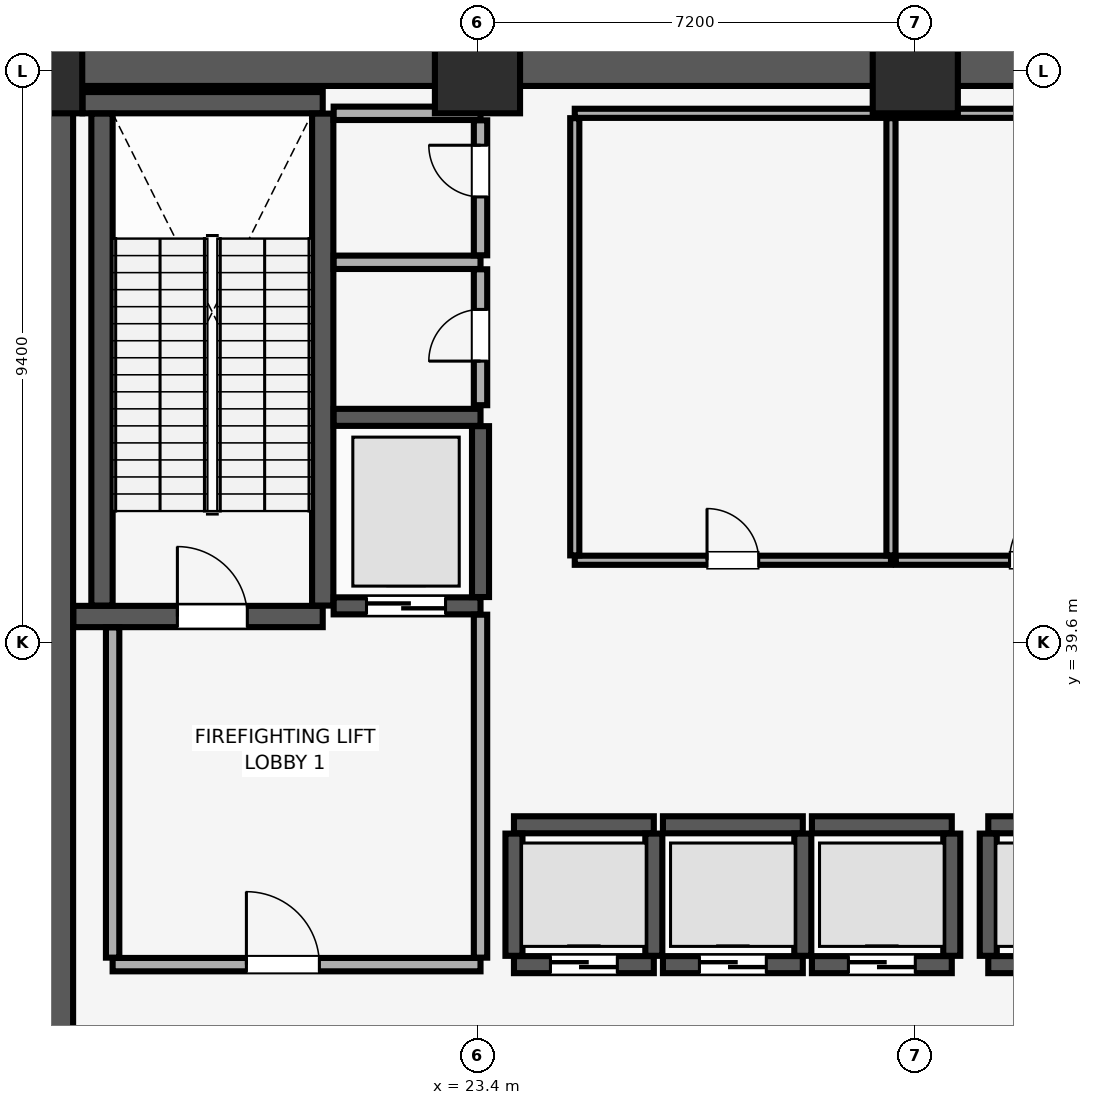
"""IFC4 building model, lengths in metres.
Left out: names, types, materials, properties, quantities, classifications, styles, units other than length and angle.
Written with IfcOpenShell. Run it as: python <this file> out.ifc"""

import sys

from ifc_helpers import new_model, si_unit, direction, frame, frame_2d, origin, origin_2d, place, context, subcontext, project, spatial, rectangle, extrude, element, fill, save


model = new_model("IFC4")
c1 = context("Model", 3, precision=1e-05, world=origin(), true_north=direction((0.0, 1.0)))
c2 = subcontext(c1, "Body", "Model", "MODEL_VIEW")
j1 = project(units=[si_unit("LENGTHUNIT", "METRE"), si_unit("PLANEANGLEUNIT", "RADIAN")], contexts=[c1])
p1 = place(None, origin())
s1 = spatial("IfcSite", under=j1, at=p1, CompositionType="ELEMENT")
p2 = place(p1, origin())
s2 = spatial("IfcBuilding", under=s1, at=p2, CompositionType="ELEMENT")
p3 = place(p2, frame((0.0, 0.0, 8.0)))
s3 = spatial("IfcBuildingStorey", under=s2, at=p3, CompositionType="ELEMENT", Elevation=8.0)
for number, where, z_axis, x_axis in (
    (1, (16.2, 49.0, 0.0), (0.0, 0.0, 1.0), (1.0, 0.0, 0.0)),
    (2, (23.4, 49.0, 0.0), (0.0, 0.0, 1.0), (1.0, 0.0, 0.0)),
    (3, (30.6, 49.0, 0.0), (0.0, 0.0, 1.0), (1.0, 0.0, 0.0)),
):
    element("IfcColumn", number, at=place(p3, frame(where, z_axis=z_axis, x_axis=x_axis)), inside=s3, PredefinedType="COLUMN", context=c2, shape_type="SweptSolid", body=[
        extrude(rectangle(XDim=1.4, YDim=1.4, at=origin_2d()), origin(), (0.0, 0.0, 1.0), 5.68),
    ])
p4 = place(p3, frame((16.2, 49.3, 0.0), z_axis=(0.0, 0.0, 1.0), x_axis=(1.0, 0.0, 0.0)))
e4 = element("IfcWall", 4, at=p4, inside=s3, PredefinedType="SHEAR", context=c2, shape_type="SweptSolid", body=[
    extrude(rectangle(XDim=51.6, YDim=1.1, at=frame_2d((25.8, 0.0))), origin(), (0.0, 0.0, 1.0), 5.68),
])
p5 = place(p3, frame((16.2, 29.4, 0.0), z_axis=(0.0, 0.0, 1.0), x_axis=(0.0, 1.0, 0.0)))
e5 = element("IfcWall", 5, at=p5, inside=s3, PredefinedType="SHEAR", context=c2, shape_type="SweptSolid", body=[
    extrude(rectangle(XDim=19.2, YDim=1.1, at=frame_2d((9.6, 0.0))), origin(), (0.0, 0.0, 1.0), 5.68),
])
p6 = place(p3, frame((16.755, 40.025, 0.0), z_axis=(0.0, 0.0, 1.0), x_axis=(1.0, 0.0, 0.0)))
e6 = element("IfcWall", 6, at=p6, inside=s3, PredefinedType="SHEAR", context=c2, shape_type="SweptSolid", body=[
    extrude(rectangle(XDim=4.1, YDim=0.35, at=frame_2d((2.05, 0.0))), origin(), (0.0, 0.0, 1.0), 5.68),
])
p7 = place(p6, frame((1.71, 0.0, 0.0)))
e7 = element("IfcOpeningElement", 7, at=p7, cuts=e6, PredefinedType="OPENING", context=c2, shape_type="SweptSolid", body=[
    extrude(rectangle(XDim=1.15, YDim=2.15, at=frame_2d((0.575, 1.075))), frame((0.0, 0.185, 0.0), z_axis=(0.0, -1.0, 0.0), x_axis=(1.0, 0.0, 0.0)), (0.0, 0.0, 1.0), 0.37),
])
p8 = place(p3, frame((16.905, 48.475, 0.0), z_axis=(0.0, 0.0, 1.0), x_axis=(1.0, 0.0, 0.0)))
e8 = element("IfcWall", 8, at=p8, inside=s3, PredefinedType="SHEAR", context=c2, shape_type="SweptSolid", body=[
    extrude(rectangle(XDim=3.95, YDim=0.35, at=frame_2d((1.975, 0.0))), origin(), (0.0, 0.0, 1.0), 5.68),
])
for number, where, z_axis, x_axis in (
    (9, (17.225, 40.205, 0.0), (0.0, 0.0, 1.0), (0.0, 1.0, 0.0)),
    (10, (20.855, 40.205, 0.0), (0.0, 0.0, 1.0), (0.0, 1.0, 0.0)),
):
    element("IfcWall", number, at=place(p3, frame(where, z_axis=z_axis, x_axis=x_axis)), inside=s3, PredefinedType="SHEAR", context=c2, shape_type="SweptSolid", body=[
        extrude(rectangle(XDim=8.09, YDim=0.35, at=frame_2d((4.045, 0.0))), origin(), (0.0, 0.0, 1.0), 5.68),
    ])
p9 = place(p3, frame((24.0, 34.3, 0.0), z_axis=(0.0, 0.0, 1.0), x_axis=(1.0, 0.0, 0.0)))
e11 = element("IfcWall", 11, at=p9, inside=s3, PredefinedType="SHEAR", context=c2, shape_type="SweptSolid", body=[
    extrude(rectangle(XDim=2.3, YDim=0.28, at=frame_2d((1.15, 0.0))), origin(), (0.0, 0.0, 1.0), 5.68),
])
p10 = place(p9, frame((0.6, 0.0, 0.0)))
e12 = element("IfcOpeningElement", 12, at=p10, cuts=e11, PredefinedType="OPENING", context=c2, shape_type="SweptSolid", body=[
    extrude(rectangle(XDim=1.1, YDim=2.2, at=frame_2d((0.55, 1.1))), frame((0.0, 0.15, 0.0), z_axis=(0.0, -1.0, 0.0), x_axis=(1.0, 0.0, 0.0)), (0.0, 0.0, 1.0), 0.3),
])
p11 = place(p3, frame((24.0, 36.6, 0.0), z_axis=(0.0, 0.0, 1.0), x_axis=(1.0, 0.0, 0.0)))
e13 = element("IfcWall", 13, at=p11, inside=s3, PredefinedType="SHEAR", context=c2, shape_type="SweptSolid", body=[
    extrude(rectangle(XDim=2.3, YDim=0.28, at=frame_2d((1.15, 0.0))), origin(), (0.0, 0.0, 1.0), 5.68),
])
for number, where, z_axis, x_axis in (
    (14, (24.0, 34.445, 0.0), (0.0, 0.0, 1.0), (0.0, 1.0, 0.0)),
    (15, (26.3, 34.445, 0.0), (0.0, 0.0, 1.0), (0.0, 1.0, 0.0)),
):
    element("IfcWall", number, at=place(p3, frame(where, z_axis=z_axis, x_axis=x_axis)), inside=s3, PredefinedType="SHEAR", context=c2, shape_type="SweptSolid", body=[
        extrude(rectangle(XDim=2.01, YDim=0.28, at=frame_2d((1.005, 0.0))), origin(), (0.0, 0.0, 1.0), 5.68),
    ])
p12 = place(p3, frame((26.45, 34.3, 0.0), z_axis=(0.0, 0.0, 1.0), x_axis=(1.0, 0.0, 0.0)))
e16 = element("IfcWall", 16, at=p12, inside=s3, PredefinedType="SHEAR", context=c2, shape_type="SweptSolid", body=[
    extrude(rectangle(XDim=2.3, YDim=0.28, at=frame_2d((1.15, 0.0))), origin(), (0.0, 0.0, 1.0), 5.68),
])
p13 = place(p12, frame((0.6, 0.0, 0.0)))
e17 = element("IfcOpeningElement", 17, at=p13, cuts=e16, PredefinedType="OPENING", context=c2, shape_type="SweptSolid", body=[
    extrude(rectangle(XDim=1.1, YDim=2.2, at=frame_2d((0.55, 1.1))), frame((0.0, 0.15, 0.0), z_axis=(0.0, -1.0, 0.0), x_axis=(1.0, 0.0, 0.0)), (0.0, 0.0, 1.0), 0.3),
])
p14 = place(p3, frame((26.45, 36.6, 0.0), z_axis=(0.0, 0.0, 1.0), x_axis=(1.0, 0.0, 0.0)))
e18 = element("IfcWall", 18, at=p14, inside=s3, PredefinedType="SHEAR", context=c2, shape_type="SweptSolid", body=[
    extrude(rectangle(XDim=2.3, YDim=0.28, at=frame_2d((1.15, 0.0))), origin(), (0.0, 0.0, 1.0), 5.68),
])
p15 = place(p3, frame((28.75, 34.445, 0.0), z_axis=(0.0, 0.0, 1.0), x_axis=(0.0, 1.0, 0.0)))
e19 = element("IfcWall", 19, at=p15, inside=s3, PredefinedType="SHEAR", context=c2, shape_type="SweptSolid", body=[
    extrude(rectangle(XDim=2.01, YDim=0.28, at=frame_2d((1.005, 0.0))), origin(), (0.0, 0.0, 1.0), 5.68),
])
p16 = place(p3, frame((28.9, 34.3, 0.0), z_axis=(0.0, 0.0, 1.0), x_axis=(1.0, 0.0, 0.0)))
e20 = element("IfcWall", 20, at=p16, inside=s3, PredefinedType="SHEAR", context=c2, shape_type="SweptSolid", body=[
    extrude(rectangle(XDim=2.3, YDim=0.28, at=frame_2d((1.15, 0.0))), origin(), (0.0, 0.0, 1.0), 5.68),
])
p17 = place(p16, frame((0.6, 0.0, 0.0)))
e21 = element("IfcOpeningElement", 21, at=p17, cuts=e20, PredefinedType="OPENING", context=c2, shape_type="SweptSolid", body=[
    extrude(rectangle(XDim=1.1, YDim=2.2, at=frame_2d((0.55, 1.1))), frame((0.0, 0.15, 0.0), z_axis=(0.0, -1.0, 0.0), x_axis=(1.0, 0.0, 0.0)), (0.0, 0.0, 1.0), 0.3),
])
p18 = place(p3, frame((28.9, 36.6, 0.0), z_axis=(0.0, 0.0, 1.0), x_axis=(1.0, 0.0, 0.0)))
e22 = element("IfcWall", 22, at=p18, inside=s3, PredefinedType="SHEAR", context=c2, shape_type="SweptSolid", body=[
    extrude(rectangle(XDim=2.3, YDim=0.28, at=frame_2d((1.15, 0.0))), origin(), (0.0, 0.0, 1.0), 5.68),
])
p19 = place(p3, frame((31.2, 34.445, 0.0), z_axis=(0.0, 0.0, 1.0), x_axis=(0.0, 1.0, 0.0)))
e23 = element("IfcWall", 23, at=p19, inside=s3, PredefinedType="SHEAR", context=c2, shape_type="SweptSolid", body=[
    extrude(rectangle(XDim=2.01, YDim=0.28, at=frame_2d((1.005, 0.0))), origin(), (0.0, 0.0, 1.0), 5.68),
])
p20 = place(p3, frame((31.8, 34.3, 0.0), z_axis=(0.0, 0.0, 1.0), x_axis=(1.0, 0.0, 0.0)))
e24 = element("IfcWall", 24, at=p20, inside=s3, PredefinedType="SHEAR", context=c2, shape_type="SweptSolid", body=[
    extrude(rectangle(XDim=2.3, YDim=0.28, at=frame_2d((1.15, 0.0))), origin(), (0.0, 0.0, 1.0), 5.68),
])
p21 = place(p20, frame((0.6, 0.0, 0.0)))
e25 = element("IfcOpeningElement", 25, at=p21, cuts=e24, PredefinedType="OPENING", context=c2, shape_type="SweptSolid", body=[
    extrude(rectangle(XDim=1.1, YDim=2.2, at=frame_2d((0.55, 1.1))), frame((0.0, 0.15, 0.0), z_axis=(0.0, -1.0, 0.0), x_axis=(1.0, 0.0, 0.0)), (0.0, 0.0, 1.0), 0.3),
])
p22 = place(p3, frame((31.8, 36.6, 0.0), z_axis=(0.0, 0.0, 1.0), x_axis=(1.0, 0.0, 0.0)))
e26 = element("IfcWall", 26, at=p22, inside=s3, PredefinedType="SHEAR", context=c2, shape_type="SweptSolid", body=[
    extrude(rectangle(XDim=2.3, YDim=0.28, at=frame_2d((1.15, 0.0))), origin(), (0.0, 0.0, 1.0), 5.68),
])
p23 = place(p3, frame((31.8, 34.445, 0.0), z_axis=(0.0, 0.0, 1.0), x_axis=(0.0, 1.0, 0.0)))
e27 = element("IfcWall", 27, at=p23, inside=s3, PredefinedType="SHEAR", context=c2, shape_type="SweptSolid", body=[
    extrude(rectangle(XDim=2.01, YDim=0.28, at=frame_2d((1.005, 0.0))), origin(), (0.0, 0.0, 1.0), 5.68),
])
p24 = place(p3, frame((21.035, 40.2, 0.0), z_axis=(0.0, 0.0, 1.0), x_axis=(1.0, 0.0, 0.0)))
e28 = element("IfcWall", 28, at=p24, inside=s3, PredefinedType="SHEAR", context=c2, shape_type="SweptSolid", body=[
    extrude(rectangle(XDim=2.415, YDim=0.28, at=frame_2d((1.208, 0.0))), origin(), (0.0, 0.0, 1.0), 5.68),
])
p25 = place(p24, frame((0.54, 0.0, 0.0)))
e29 = element("IfcOpeningElement", 29, at=p25, cuts=e28, PredefinedType="OPENING", context=c2, shape_type="SweptSolid", body=[
    extrude(rectangle(XDim=1.3, YDim=2.3, at=frame_2d((0.65, 1.15))), frame((0.0, 0.15, 0.0), z_axis=(0.0, -1.0, 0.0), x_axis=(1.0, 0.0, 0.0)), (0.0, 0.0, 1.0), 0.3),
])
p26 = place(p3, frame((21.035, 43.3, 0.0), z_axis=(0.0, 0.0, 1.0), x_axis=(1.0, 0.0, 0.0)))
e30 = element("IfcWall", 30, at=p26, inside=s3, PredefinedType="SHEAR", context=c2, shape_type="SweptSolid", body=[
    extrude(rectangle(XDim=2.415, YDim=0.28, at=frame_2d((1.208, 0.0))), origin(), (0.0, 0.0, 1.0), 5.68),
])
p27 = place(p3, frame((23.45, 40.345, 0.0), z_axis=(0.0, 0.0, 1.0), x_axis=(0.0, 1.0, 0.0)))
e31 = element("IfcWall", 31, at=p27, inside=s3, PredefinedType="SHEAR", context=c2, shape_type="SweptSolid", body=[
    extrude(rectangle(XDim=2.81, YDim=0.28, at=frame_2d((1.405, 0.0))), origin(), (0.0, 0.0, 1.0), 5.68),
])
p28 = place(p3, frame((17.4, 34.3, 0.0), z_axis=(0.0, 0.0, 1.0), x_axis=(1.0, 0.0, 0.0)))
e32 = element("IfcWall", 32, at=p28, inside=s3, PredefinedType="PARTITIONING", context=c2, shape_type="SweptSolid", body=[
    extrude(rectangle(XDim=6.05, YDim=0.22, at=frame_2d((3.025, 0.0))), origin(), (0.0, 0.0, 1.0), 5.68),
])
p29 = place(p28, frame((2.2, 0.0, 0.0)))
e33 = element("IfcOpeningElement", 33, at=p29, cuts=e32, PredefinedType="OPENING", context=c2, shape_type="SweptSolid", body=[
    extrude(rectangle(XDim=1.2, YDim=2.15, at=frame_2d((0.6, 1.075))), frame((0.0, 0.12, 0.0), z_axis=(0.0, -1.0, 0.0), x_axis=(1.0, 0.0, 0.0)), (0.0, 0.0, 1.0), 0.24),
])
p30 = place(p3, frame((17.4, 34.415, 0.0), z_axis=(0.0, 0.0, 1.0), x_axis=(0.0, 1.0, 0.0)))
e34 = element("IfcWall", 34, at=p30, inside=s3, PredefinedType="PARTITIONING", context=c2, shape_type="SweptSolid", body=[
    extrude(rectangle(XDim=5.43, YDim=0.22, at=frame_2d((2.715, 0.0))), origin(), (0.0, 0.0, 1.0), 5.68),
])
p31 = place(p3, frame((23.45, 34.415, 0.0), z_axis=(0.0, 0.0, 1.0), x_axis=(0.0, 1.0, 0.0)))
e35 = element("IfcWall", 35, at=p31, inside=s3, PredefinedType="PARTITIONING", context=c2, shape_type="SweptSolid", body=[
    extrude(rectangle(XDim=5.64, YDim=0.22, at=frame_2d((2.82, 0.0))), origin(), (0.0, 0.0, 1.0), 5.68),
])
p32 = place(p3, frame((21.035, 45.85, 0.0), z_axis=(0.0, 0.0, 1.0), x_axis=(1.0, 0.0, 0.0)))
e36 = element("IfcWall", 36, at=p32, inside=s3, PredefinedType="PARTITIONING", context=c2, shape_type="SweptSolid", body=[
    extrude(rectangle(XDim=2.415, YDim=0.22, at=frame_2d((1.208, 0.0))), origin(), (0.0, 0.0, 1.0), 5.68),
])
p33 = place(p3, frame((23.45, 43.5, 0.0), z_axis=(0.0, 0.0, 1.0), x_axis=(0.0, 1.0, 0.0)))
e37 = element("IfcWall", 37, at=p33, inside=s3, PredefinedType="PARTITIONING", context=c2, shape_type="SweptSolid", body=[
    extrude(rectangle(XDim=2.235, YDim=0.22, at=frame_2d((1.118, 0.0))), origin(), (0.0, 0.0, 1.0), 5.68),
])
p34 = place(p33, frame((0.725, 0.0, 0.0)))
e38 = element("IfcOpeningElement", 38, at=p34, cuts=e37, PredefinedType="OPENING", context=c2, shape_type="SweptSolid", body=[
    extrude(rectangle(XDim=0.85, YDim=2.1, at=frame_2d((0.425, 1.05))), frame((0.0, 0.12, 0.0), z_axis=(0.0, -1.0, 0.0), x_axis=(1.0, 0.0, 0.0)), (0.0, 0.0, 1.0), 0.24),
])
p35 = place(p3, frame((21.035, 48.3, 0.0), z_axis=(0.0, 0.0, 1.0), x_axis=(1.0, 0.0, 0.0)))
e39 = element("IfcWall", 39, at=p35, inside=s3, PredefinedType="PARTITIONING", context=c2, shape_type="SweptSolid", body=[
    extrude(rectangle(XDim=2.415, YDim=0.22, at=frame_2d((1.208, 0.0))), origin(), (0.0, 0.0, 1.0), 5.68),
])
p36 = place(p3, frame((23.45, 45.965, 0.0), z_axis=(0.0, 0.0, 1.0), x_axis=(0.0, 1.0, 0.0)))
e40 = element("IfcWall", 40, at=p36, inside=s3, PredefinedType="PARTITIONING", context=c2, shape_type="SweptSolid", body=[
    extrude(rectangle(XDim=2.22, YDim=0.22, at=frame_2d((1.11, 0.0))), origin(), (0.0, 0.0, 1.0), 5.68),
])
p37 = place(p36, frame((0.96, 0.0, 0.0)))
e41 = element("IfcOpeningElement", 41, at=p37, cuts=e40, PredefinedType="OPENING", context=c2, shape_type="SweptSolid", body=[
    extrude(rectangle(XDim=0.85, YDim=2.1, at=frame_2d((0.425, 1.05))), frame((0.0, 0.12, 0.0), z_axis=(0.0, -1.0, 0.0), x_axis=(1.0, 0.0, 0.0)), (0.0, 0.0, 1.0), 0.24),
])
p38 = place(p3, frame((25.0, 40.95, 0.0), z_axis=(0.0, 0.0, 1.0), x_axis=(1.0, 0.0, 0.0)))
e42 = element("IfcWall", 42, at=p38, inside=s3, PredefinedType="PARTITIONING", context=c2, shape_type="SweptSolid", body=[
    extrude(rectangle(XDim=5.2, YDim=0.15, at=frame_2d((2.6, 0.0))), origin(), (0.0, 0.0, 1.0), 5.68),
])
p39 = place(p38, frame((2.175, 0.0, 0.0)))
e43 = element("IfcOpeningElement", 43, at=p39, cuts=e42, PredefinedType="OPENING", context=c2, shape_type="SweptSolid", body=[
    extrude(rectangle(XDim=0.85, YDim=2.1, at=frame_2d((0.425, 1.05))), frame((0.0, 0.085, 0.0), z_axis=(0.0, -1.0, 0.0), x_axis=(1.0, 0.0, 0.0)), (0.0, 0.0, 1.0), 0.17),
])
p40 = place(p3, frame((25.0, 48.3, 0.0), z_axis=(0.0, 0.0, 1.0), x_axis=(1.0, 0.0, 0.0)))
e44 = element("IfcWall", 44, at=p40, inside=s3, PredefinedType="PARTITIONING", context=c2, shape_type="SweptSolid", body=[
    extrude(rectangle(XDim=5.2, YDim=0.15, at=frame_2d((2.6, 0.0))), origin(), (0.0, 0.0, 1.0), 5.68),
])
for number, where, z_axis, x_axis in (
    (45, (25.0, 41.03, 0.0), (0.0, 0.0, 1.0), (0.0, 1.0, 0.0)),
    (46, (30.2, 41.03, 0.0), (0.0, 0.0, 1.0), (0.0, 1.0, 0.0)),
):
    element("IfcWall", number, at=place(p3, frame(where, z_axis=z_axis, x_axis=x_axis)), inside=s3, PredefinedType="PARTITIONING", context=c2, shape_type="SweptSolid", body=[
        extrude(rectangle(XDim=7.19, YDim=0.15, at=frame_2d((3.595, 0.0))), origin(), (0.0, 0.0, 1.0), 5.68),
    ])
p41 = place(p3, frame((30.28, 40.95, 0.0), z_axis=(0.0, 0.0, 1.0), x_axis=(1.0, 0.0, 0.0)))
e47 = element("IfcWall", 47, at=p41, inside=s3, PredefinedType="PARTITIONING", context=c2, shape_type="SweptSolid", body=[
    extrude(rectangle(XDim=4.82, YDim=0.15, at=frame_2d((2.41, 0.0))), origin(), (0.0, 0.0, 1.0), 5.68),
])
p42 = place(p41, frame((1.87, 0.0, 0.0)))
e48 = element("IfcOpeningElement", 48, at=p42, cuts=e47, PredefinedType="OPENING", context=c2, shape_type="SweptSolid", body=[
    extrude(rectangle(XDim=1.0, YDim=2.15, at=frame_2d((0.5, 1.075))), frame((0.0, 0.085, 0.0), z_axis=(0.0, -1.0, 0.0), x_axis=(1.0, 0.0, 0.0)), (0.0, 0.0, 1.0), 0.17),
])
p43 = place(p3, frame((30.28, 48.3, 0.0), z_axis=(0.0, 0.0, 1.0), x_axis=(1.0, 0.0, 0.0)))
e49 = element("IfcWall", 49, at=p43, inside=s3, PredefinedType="PARTITIONING", context=c2, shape_type="SweptSolid", body=[
    extrude(rectangle(XDim=4.82, YDim=0.15, at=frame_2d((2.41, 0.0))), origin(), (0.0, 0.0, 1.0), 5.68),
])
p44 = place(p7, origin())
e50 = element("IfcDoor", 50, at=p44, inside=s3, OperationType="SINGLE_SWING_LEFT", PredefinedType="DOOR", context=c2, shape_type="SweptSolid", body=[
    extrude(rectangle(XDim=1.15, YDim=2.15, at=frame_2d((0.575, 1.075))), frame((0.0, 0.025, 0.0), z_axis=(0.0, -1.0, 0.0), x_axis=(1.0, 0.0, 0.0)), (0.0, 0.0, 1.0), 0.05),
])
fill(e7, e50)
p45 = place(p10, origin())
e51 = element("IfcDoor", 51, at=p45, inside=s3, OperationType="DOUBLE_DOOR_SLIDING", PredefinedType="DOOR", context=c2, shape_type="SweptSolid", body=[
    extrude(rectangle(XDim=1.1, YDim=2.2, at=frame_2d((0.55, 1.1))), frame((0.0, 0.025, 0.0), z_axis=(0.0, -1.0, 0.0), x_axis=(1.0, 0.0, 0.0)), (0.0, 0.0, 1.0), 0.05),
])
fill(e12, e51)
p46 = place(p13, origin())
e52 = element("IfcDoor", 52, at=p46, inside=s3, OperationType="DOUBLE_DOOR_SLIDING", PredefinedType="DOOR", context=c2, shape_type="SweptSolid", body=[
    extrude(rectangle(XDim=1.1, YDim=2.2, at=frame_2d((0.55, 1.1))), frame((0.0, 0.025, 0.0), z_axis=(0.0, -1.0, 0.0), x_axis=(1.0, 0.0, 0.0)), (0.0, 0.0, 1.0), 0.05),
])
fill(e17, e52)
p47 = place(p17, origin())
e53 = element("IfcDoor", 53, at=p47, inside=s3, OperationType="DOUBLE_DOOR_SLIDING", PredefinedType="DOOR", context=c2, shape_type="SweptSolid", body=[
    extrude(rectangle(XDim=1.1, YDim=2.2, at=frame_2d((0.55, 1.1))), frame((0.0, 0.025, 0.0), z_axis=(0.0, -1.0, 0.0), x_axis=(1.0, 0.0, 0.0)), (0.0, 0.0, 1.0), 0.05),
])
fill(e21, e53)
p48 = place(p25, origin())
e54 = element("IfcDoor", 54, at=p48, inside=s3, OperationType="DOUBLE_DOOR_SLIDING", PredefinedType="DOOR", context=c2, shape_type="SweptSolid", body=[
    extrude(rectangle(XDim=1.3, YDim=2.3, at=frame_2d((0.65, 1.15))), frame((0.0, 0.025, 0.0), z_axis=(0.0, -1.0, 0.0), x_axis=(1.0, 0.0, 0.0)), (0.0, 0.0, 1.0), 0.05),
])
fill(e29, e54)
p49 = place(p29, origin())
e55 = element("IfcDoor", 55, at=p49, inside=s3, OperationType="SINGLE_SWING_LEFT", PredefinedType="DOOR", context=c2, shape_type="SweptSolid", body=[
    extrude(rectangle(XDim=1.2, YDim=2.15, at=frame_2d((0.6, 1.075))), frame((0.0, 0.025, 0.0), z_axis=(0.0, -1.0, 0.0), x_axis=(1.0, 0.0, 0.0)), (0.0, 0.0, 1.0), 0.05),
])
fill(e33, e55)
p50 = place(p34, origin())
e56 = element("IfcDoor", 56, at=p50, inside=s3, OperationType="SINGLE_SWING_LEFT", PredefinedType="DOOR", context=c2, shape_type="SweptSolid", body=[
    extrude(rectangle(XDim=0.85, YDim=2.1, at=frame_2d((0.425, 1.05))), frame((0.0, 0.025, 0.0), z_axis=(0.0, -1.0, 0.0), x_axis=(1.0, 0.0, 0.0)), (0.0, 0.0, 1.0), 0.05),
])
fill(e38, e56)
p51 = place(p37, origin())
e57 = element("IfcDoor", 57, at=p51, inside=s3, OperationType="SINGLE_SWING_RIGHT", PredefinedType="DOOR", context=c2, shape_type="SweptSolid", body=[
    extrude(rectangle(XDim=0.85, YDim=2.1, at=frame_2d((0.425, 1.05))), frame((0.0, 0.025, 0.0), z_axis=(0.0, -1.0, 0.0), x_axis=(1.0, 0.0, 0.0)), (0.0, 0.0, 1.0), 0.05),
])
fill(e41, e57)
p52 = place(p39, origin())
e58 = element("IfcDoor", 58, at=p52, inside=s3, OperationType="SINGLE_SWING_LEFT", PredefinedType="DOOR", context=c2, shape_type="SweptSolid", body=[
    extrude(rectangle(XDim=0.85, YDim=2.1, at=frame_2d((0.425, 1.05))), frame((0.0, 0.025, 0.0), z_axis=(0.0, -1.0, 0.0), x_axis=(1.0, 0.0, 0.0)), (0.0, 0.0, 1.0), 0.05),
])
fill(e43, e58)
p53 = place(p42, origin())
e59 = element("IfcDoor", 59, at=p53, inside=s3, OperationType="SINGLE_SWING_RIGHT", PredefinedType="DOOR", context=c2, shape_type="SweptSolid", body=[
    extrude(rectangle(XDim=1.0, YDim=2.15, at=frame_2d((0.5, 1.075))), frame((0.0, 0.025, 0.0), z_axis=(0.0, -1.0, 0.0), x_axis=(1.0, 0.0, 0.0)), (0.0, 0.0, 1.0), 0.05),
])
fill(e48, e59)
save(model, sys.argv[1])
